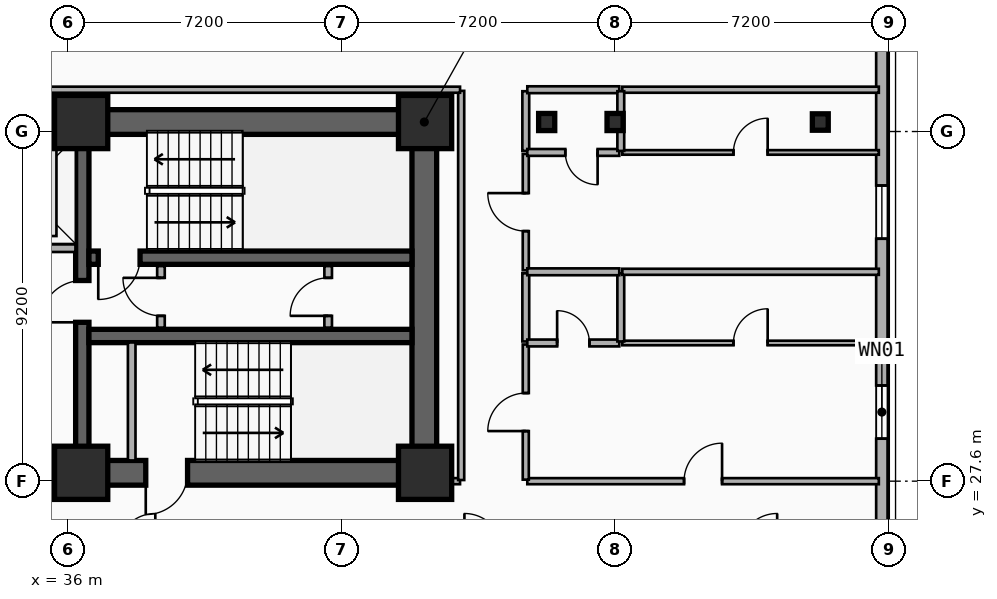
"""IFC4 building model, lengths in metres.
Left out: names, types, materials, properties, quantities, classifications, styles, units other than length and angle.
Written with IfcOpenShell. Run it as: python <this file> out.ifc"""

import sys

from ifc_helpers import new_model, si_unit, direction, frame, frame_2d, origin, origin_2d, place, context, subcontext, project, spatial, rectangle, i_section, extrude, element, fill, save


model = new_model("IFC4")
c1 = context("Model", 3, precision=1e-05, world=origin(), true_north=direction((0.0, 1.0)))
c2 = subcontext(c1, "Body", "Model", "MODEL_VIEW")
j1 = project(units=[si_unit("LENGTHUNIT", "METRE"), si_unit("PLANEANGLEUNIT", "RADIAN")], contexts=[c1])
p1 = place(None, origin())
s1 = spatial("IfcSite", under=j1, at=p1, CompositionType="ELEMENT")
p2 = place(p1, origin())
s2 = spatial("IfcBuilding", under=s1, at=p2, CompositionType="ELEMENT")
p3 = place(p2, frame((0.0, 0.0, 82.8)))
s3 = spatial("IfcBuildingStorey", under=s2, at=p3, CompositionType="ELEMENT", Elevation=82.8)
p4 = place(p3, frame((12.15, 37.05, 0.0), z_axis=(0.0, 0.0, 1.0), x_axis=(1.0, 0.0, 0.0)))
e1 = element("IfcWall", 1, at=p4, inside=s3, PredefinedType="SHEAR", context=c2, shape_type="SweptSolid", body=[
    extrude(rectangle(XDim=33.23, YDim=0.65, at=frame_2d((16.615, 0.0))), origin(), (0.0, 0.0, 1.0), 3.5),
])
p5 = place(p3, frame((45.38, 27.82, 0.0), z_axis=(0.0, 0.0, 1.0), x_axis=(-1.0, 0.0, 0.0)))
e2 = element("IfcWall", 2, at=p5, inside=s3, PredefinedType="SHEAR", context=c2, shape_type="SweptSolid", body=[
    extrude(rectangle(XDim=12.23, YDim=0.65, at=frame_2d((6.115, 0.0))), origin(), (0.0, 0.0, 1.0), 3.5),
])
p6 = place(p5, frame((9.93, 0.0, 0.0)))
e3 = element("IfcOpeningElement", 3, at=p6, cuts=e2, PredefinedType="OPENING", context=c2, shape_type="SweptSolid", body=[
    extrude(rectangle(XDim=1.1, YDim=2.15, at=frame_2d((0.55, 1.075))), frame((0.0, 0.335, 0.0), z_axis=(0.0, -1.0, 0.0), x_axis=(1.0, 0.0, 0.0)), (0.0, 0.0, 1.0), 0.67),
])
p7 = place(p5, frame((6.23, 0.0, 0.0)))
e4 = element("IfcOpeningElement", 4, at=p7, cuts=e2, PredefinedType="OPENING", context=c2, shape_type="SweptSolid", body=[
    extrude(rectangle(XDim=1.1, YDim=2.15, at=frame_2d((0.55, 1.075))), frame((0.0, 0.335, 0.0), z_axis=(0.0, -1.0, 0.0), x_axis=(1.0, 0.0, 0.0)), (0.0, 0.0, 1.0), 0.67),
])
p8 = place(p3, frame((45.38, 28.145, 0.0), z_axis=(0.0, 0.0, 1.0), x_axis=(0.0, 1.0, 0.0)))
e5 = element("IfcWall", 5, at=p8, inside=s3, PredefinedType="SHEAR", context=c2, shape_type="SweptSolid", body=[
    extrude(rectangle(XDim=8.58, YDim=0.65, at=frame_2d((4.29, 0.0))), origin(), (0.0, 0.0, 1.0), 3.5),
])
p9 = place(p3, frame((36.38, 28.145, 0.0), z_axis=(0.0, 0.0, 1.0), x_axis=(0.0, 1.0, 0.0)))
e6 = element("IfcWall", 6, at=p9, inside=s3, PredefinedType="SHEAR", context=c2, shape_type="SweptSolid", body=[
    extrude(rectangle(XDim=8.58, YDim=0.35, at=frame_2d((4.29, 0.0))), origin(), (0.0, 0.0, 1.0), 3.5),
])
p10 = place(p9, frame((3.635, 0.0, 0.0)))
e7 = element("IfcOpeningElement", 7, at=p10, cuts=e6, PredefinedType="OPENING", context=c2, shape_type="SweptSolid", body=[
    extrude(rectangle(XDim=1.1, YDim=2.15, at=frame_2d((0.55, 1.075))), frame((0.0, 0.185, 0.0), z_axis=(0.0, -1.0, 0.0), x_axis=(1.0, 0.0, 0.0)), (0.0, 0.0, 1.0), 0.37),
])
p11 = place(p3, frame((45.055, 33.48, 0.0), z_axis=(0.0, 0.0, 1.0), x_axis=(-1.0, 0.0, 0.0)))
e8 = element("IfcWall", 8, at=p11, inside=s3, PredefinedType="SHEAR", context=c2, shape_type="SweptSolid", body=[
    extrude(rectangle(XDim=8.5, YDim=0.35, at=frame_2d((4.25, 0.0))), origin(), (0.0, 0.0, 1.0), 3.5),
])
p12 = place(p11, frame((7.155, 0.0, 0.0)))
e9 = element("IfcOpeningElement", 9, at=p12, cuts=e8, PredefinedType="OPENING", context=c2, shape_type="SweptSolid", body=[
    extrude(rectangle(XDim=1.1, YDim=2.15, at=frame_2d((0.55, 1.075))), frame((0.0, 0.185, 0.0), z_axis=(0.0, -1.0, 0.0), x_axis=(1.0, 0.0, 0.0)), (0.0, 0.0, 1.0), 0.37),
])
p13 = place(p3, frame((36.555, 31.42, 0.0), z_axis=(0.0, 0.0, 1.0), x_axis=(1.0, 0.0, 0.0)))
e10 = element("IfcWall", 10, at=p13, inside=s3, PredefinedType="SHEAR", context=c2, shape_type="SweptSolid", body=[
    extrude(rectangle(XDim=8.5, YDim=0.35, at=frame_2d((4.25, 0.0))), origin(), (0.0, 0.0, 1.0), 3.5),
])
for number, where, z_axis, x_axis in (
    (11, (36.35, 27.82, 0.0), (0.0, 0.0, 1.0), (1.0, 0.0, 0.0)),
    (12, (36.35, 37.05, 0.0), (0.0, 0.0, 1.0), (1.0, 0.0, 0.0)),
    (13, (45.4, 27.82, 0.0), (0.0, 0.0, 1.0), (1.0, 0.0, 0.0)),
    (14, (45.4, 37.05, 0.0), (0.0, 0.0, 1.0), (1.0, 0.0, 0.0)),
):
    element("IfcColumn", number, at=place(p3, frame(where, z_axis=z_axis, x_axis=x_axis)), inside=s3, PredefinedType="COLUMN", context=c2, shape_type="SweptSolid", body=[
        extrude(rectangle(XDim=1.4, YDim=1.4, at=origin_2d()), origin(), (0.0, 0.0, 1.0), 3.5),
    ])
for number, where, z_axis, x_axis in (
    (15, (48.6, 37.05, 0.0), (0.0, 0.0, 1.0), (1.0, 0.0, 0.0)),
    (16, (50.4, 37.05, 0.0), (0.0, 0.0, 1.0), (1.0, 0.0, 0.0)),
):
    element("IfcColumn", number, at=place(p3, frame(where, z_axis=z_axis, x_axis=x_axis)), inside=s3, PredefinedType="COLUMN", context=c2, shape_type="SweptSolid", body=[
        extrude(i_section(OverallWidth=0.424, OverallDepth=0.45, WebThickness=0.041, FlangeThickness=0.065, FilletRadius=0.015, at=origin_2d()), origin(), (0.0, 0.0, 1.0), 3.5),
    ])
p14 = place(p3, frame((55.8, 37.05, 0.0), z_axis=(0.0, 0.0, 1.0), x_axis=(1.0, 0.0, 0.0)))
e17 = element("IfcColumn", 17, at=p14, inside=s3, PredefinedType="COLUMN", context=c2, shape_type="SweptSolid", body=[
    extrude(i_section(OverallWidth=0.418, OverallDepth=0.432, WebThickness=0.035, FlangeThickness=0.056, FilletRadius=0.015, at=origin_2d()), origin(), (0.0, 0.0, 1.0), 3.5),
])
p15 = place(p3, frame((57.42, 39.0, 0.0), z_axis=(0.0, 0.0, 1.0), x_axis=(0.0, -1.0, 0.0)))
e18 = element("IfcWall", 18, at=p15, inside=s3, PredefinedType="SOLIDWALL", context=c2, shape_type="SweptSolid", body=[
    extrude(rectangle(XDim=18.0, YDim=0.3, at=frame_2d((9.0, 0.0))), origin(), (0.0, 0.0, 1.0), 3.24),
])
p16 = place(p15, frame((8.882, 0.0, 0.48)))
e19 = element("IfcOpeningElement", 19, at=p16, cuts=e18, PredefinedType="OPENING", context=c2, shape_type="SweptSolid", body=[
    extrude(rectangle(XDim=1.4, YDim=1.8, at=frame_2d((0.7, 0.9))), frame((0.0, 0.16, 0.0), z_axis=(0.0, -1.0, 0.0), x_axis=(1.0, 0.0, 0.0)), (0.0, 0.0, 1.0), 0.32),
])
p17 = place(p15, frame((3.621, 0.0, 0.48)))
e20 = element("IfcOpeningElement", 20, at=p17, cuts=e18, PredefinedType="OPENING", context=c2, shape_type="SweptSolid", body=[
    extrude(rectangle(XDim=1.4, YDim=1.8, at=frame_2d((0.7, 0.9))), frame((0.0, 0.16, 0.0), z_axis=(0.0, -1.0, 0.0), x_axis=(1.0, 0.0, 0.0)), (0.0, 0.0, 1.0), 0.32),
])
p18 = place(p15, frame((16.28, 0.0, 0.65)))
e21 = element("IfcOpeningElement", 21, at=p18, cuts=e18, PredefinedType="OPENING", context=c2, shape_type="SweptSolid", body=[
    extrude(rectangle(XDim=1.4, YDim=1.8, at=frame_2d((0.7, 0.9))), frame((0.0, 0.16, 0.0), z_axis=(0.0, -1.0, 0.0), x_axis=(1.0, 0.0, 0.0)), (0.0, 0.0, 1.0), 0.32),
])
p19 = place(p3, frame((33.475, 33.73, 0.0), z_axis=(0.0, 0.0, 1.0), x_axis=(1.0, 0.0, 0.0)))
e22 = element("IfcWall", 22, at=p19, inside=s3, PredefinedType="PARTITIONING", context=c2, shape_type="SweptSolid", body=[
    extrude(rectangle(XDim=2.725, YDim=0.2, at=frame_2d((1.362, 0.0))), origin(), (0.0, 0.0, 1.0), 2.212),
])
p20 = place(p19, frame((0.812, 0.0, 0.0)))
e23 = element("IfcOpeningElement", 23, at=p20, cuts=e22, PredefinedType="OPENING", context=c2, shape_type="SweptSolid", body=[
    extrude(rectangle(XDim=1.1, YDim=2.15, at=frame_2d((0.55, 1.075))), frame((0.0, 0.11, 0.0), z_axis=(0.0, -1.0, 0.0), x_axis=(1.0, 0.0, 0.0)), (0.0, 0.0, 1.0), 0.22),
])
p21 = place(p3, frame((37.68, 28.145, 0.0), z_axis=(0.0, 0.0, 1.0), x_axis=(0.0, 1.0, 0.0)))
e24 = element("IfcWall", 24, at=p21, inside=s3, PredefinedType="PARTITIONING", context=c2, shape_type="SweptSolid", body=[
    extrude(rectangle(XDim=3.105, YDim=0.2, at=frame_2d((1.552, 0.0))), origin(), (0.0, 0.0, 1.0), 2.62),
])
p22 = place(p3, frame((38.45, 31.64, 0.0), z_axis=(0.0, 0.0, 1.0), x_axis=(0.0, 1.0, 0.0)))
e25 = element("IfcWall", 25, at=p22, inside=s3, PredefinedType="PARTITIONING", context=c2, shape_type="SweptSolid", body=[
    extrude(rectangle(XDim=1.62, YDim=0.2, at=frame_2d((0.81, 0.0))), origin(), (0.0, 0.0, 1.0), 3.24),
])
p23 = place(p22, frame((0.31, 0.0, 0.0)))
e26 = element("IfcOpeningElement", 26, at=p23, cuts=e25, PredefinedType="OPENING", context=c2, shape_type="SweptSolid", body=[
    extrude(rectangle(XDim=1.0, YDim=2.15, at=frame_2d((0.5, 1.075))), frame((0.0, 0.11, 0.0), z_axis=(0.0, -1.0, 0.0), x_axis=(1.0, 0.0, 0.0)), (0.0, 0.0, 1.0), 0.22),
])
p24 = place(p3, frame((42.85, 31.64, 0.0), z_axis=(0.0, 0.0, 1.0), x_axis=(0.0, 1.0, 0.0)))
e27 = element("IfcWall", 27, at=p24, inside=s3, PredefinedType="PARTITIONING", context=c2, shape_type="SweptSolid", body=[
    extrude(rectangle(XDim=1.62, YDim=0.2, at=frame_2d((0.81, 0.0))), origin(), (0.0, 0.0, 1.0), 3.24),
])
p25 = place(p24, frame((0.31, 0.0, 0.0)))
e28 = element("IfcOpeningElement", 28, at=p25, cuts=e27, PredefinedType="OPENING", context=c2, shape_type="SweptSolid", body=[
    extrude(rectangle(XDim=1.0, YDim=2.15, at=frame_2d((0.5, 1.075))), frame((0.0, 0.11, 0.0), z_axis=(0.0, -1.0, 0.0), x_axis=(1.0, 0.0, 0.0)), (0.0, 0.0, 1.0), 0.22),
])
p26 = place(p3, frame((48.09, 27.6, 0.0), z_axis=(0.0, 0.0, 1.0), x_axis=(1.0, 0.0, 0.0)))
e29 = element("IfcWall", 29, at=p26, inside=s3, PredefinedType="PARTITIONING", context=c2, shape_type="SweptSolid", body=[
    extrude(rectangle(XDim=9.25, YDim=0.16, at=frame_2d((4.625, 0.0))), origin(), (0.0, 0.0, 1.0), 2.57),
])
p27 = place(p26, frame((4.125, 0.0, 0.0)))
e30 = element("IfcOpeningElement", 30, at=p27, cuts=e29, PredefinedType="OPENING", context=c2, shape_type="SweptSolid", body=[
    extrude(rectangle(XDim=1.0, YDim=2.15, at=frame_2d((0.5, 1.075))), frame((0.0, 0.09, 0.0), z_axis=(0.0, -1.0, 0.0), x_axis=(1.0, 0.0, 0.0)), (0.0, 0.0, 1.0), 0.18),
])
p28 = place(p3, frame((48.05, 27.64, 0.0), z_axis=(0.0, 0.0, 1.0), x_axis=(0.0, 1.0, 0.0)))
e31 = element("IfcWall", 31, at=p28, inside=s3, PredefinedType="PARTITIONING", context=c2, shape_type="SweptSolid", body=[
    extrude(rectangle(XDim=3.556, YDim=0.16, at=frame_2d((1.778, 0.0))), origin(), (0.0, 0.0, 1.0), 3.24),
])
p29 = place(p28, frame((1.278, 0.0, 0.0)))
e32 = element("IfcOpeningElement", 32, at=p29, cuts=e31, PredefinedType="OPENING", context=c2, shape_type="SweptSolid", body=[
    extrude(rectangle(XDim=1.0, YDim=2.15, at=frame_2d((0.5, 1.075))), frame((0.0, 0.09, 0.0), z_axis=(0.0, -1.0, 0.0), x_axis=(1.0, 0.0, 0.0)), (0.0, 0.0, 1.0), 0.18),
])
p30 = place(p3, frame((48.05, 31.276, 0.0), z_axis=(0.0, 0.0, 1.0), x_axis=(0.0, 1.0, 0.0)))
e33 = element("IfcWall", 33, at=p30, inside=s3, PredefinedType="PLUMBINGWALL", context=c2, shape_type="SweptSolid", body=[
    extrude(rectangle(XDim=1.793, YDim=0.18, at=frame_2d((0.896, 0.0))), origin(), (0.0, 0.0, 1.0), 3.24),
])
p31 = place(p3, frame((48.05, 33.149, 0.0), z_axis=(0.0, 0.0, 1.0), x_axis=(0.0, 1.0, 0.0)))
e34 = element("IfcWall", 34, at=p31, inside=s3, PredefinedType="PARTITIONING", context=c2, shape_type="SweptSolid", body=[
    extrude(rectangle(XDim=3.061, YDim=0.16, at=frame_2d((1.531, 0.0))), origin(), (0.0, 0.0, 1.0), 3.24),
])
p32 = place(p31, frame((1.031, 0.0, 0.0)))
e35 = element("IfcOpeningElement", 35, at=p32, cuts=e34, PredefinedType="OPENING", context=c2, shape_type="SweptSolid", body=[
    extrude(rectangle(XDim=1.0, YDim=2.15, at=frame_2d((0.5, 1.075))), frame((0.0, 0.09, 0.0), z_axis=(0.0, -1.0, 0.0), x_axis=(1.0, 0.0, 0.0)), (0.0, 0.0, 1.0), 0.18),
])
p33 = place(p3, frame((48.05, 36.29, 0.0), z_axis=(0.0, 0.0, 1.0), x_axis=(0.0, 1.0, 0.0)))
e36 = element("IfcWall", 36, at=p33, inside=s3, PredefinedType="PLUMBINGWALL", context=c2, shape_type="SweptSolid", body=[
    extrude(rectangle(XDim=1.57, YDim=0.18, at=frame_2d((0.785, 0.0))), origin(), (0.0, 0.0, 1.0), 2.72),
])
p34 = place(p3, frame((48.09, 37.9, 0.0), z_axis=(0.0, 0.0, 1.0), x_axis=(1.0, 0.0, 0.0)))
e37 = element("IfcWall", 37, at=p34, inside=s3, PredefinedType="PLUMBINGWALL", context=c2, shape_type="SweptSolid", body=[
    extrude(rectangle(XDim=2.42, YDim=0.18, at=frame_2d((1.21, 0.0))), origin(), (0.0, 0.0, 1.0), 3.24),
])
p35 = place(p3, frame((50.59, 37.9, 0.0), z_axis=(0.0, 0.0, 1.0), x_axis=(1.0, 0.0, 0.0)))
e38 = element("IfcWall", 38, at=p35, inside=s3, PredefinedType="PARTITIONING", context=c2, shape_type="SweptSolid", body=[
    extrude(rectangle(XDim=6.75, YDim=0.16, at=frame_2d((3.375, 0.0))), origin(), (0.0, 0.0, 1.0), 3.24),
])
p36 = place(p3, frame((48.09, 31.236, 0.0), z_axis=(0.0, 0.0, 1.0), x_axis=(1.0, 0.0, 0.0)))
e39 = element("IfcWall", 39, at=p36, inside=s3, PredefinedType="PLUMBINGWALL", context=c2, shape_type="SweptSolid", body=[
    extrude(rectangle(XDim=2.42, YDim=0.18, at=frame_2d((1.21, 0.0))), origin(), (0.0, 0.0, 1.0), 2.57),
])
p37 = place(p36, frame((0.785, 0.0, 0.0)))
e40 = element("IfcOpeningElement", 40, at=p37, cuts=e39, PredefinedType="OPENING", context=c2, shape_type="SweptSolid", body=[
    extrude(rectangle(XDim=0.85, YDim=2.1, at=frame_2d((0.425, 1.05))), frame((0.0, 0.1, 0.0), z_axis=(0.0, -1.0, 0.0), x_axis=(1.0, 0.0, 0.0)), (0.0, 0.0, 1.0), 0.2),
])
p38 = place(p3, frame((50.59, 31.236, 0.0), z_axis=(0.0, 0.0, 1.0), x_axis=(1.0, 0.0, 0.0)))
e41 = element("IfcWall", 41, at=p38, inside=s3, PredefinedType="PARTITIONING", context=c2, shape_type="SweptSolid", body=[
    extrude(rectangle(XDim=6.75, YDim=0.12, at=frame_2d((3.375, 0.0))), origin(), (0.0, 0.0, 1.0), 2.57),
])
p39 = place(p38, frame((2.925, 0.0, 0.0)))
e42 = element("IfcOpeningElement", 42, at=p39, cuts=e41, PredefinedType="OPENING", context=c2, shape_type="SweptSolid", body=[
    extrude(rectangle(XDim=0.9, YDim=2.1, at=frame_2d((0.45, 1.05))), frame((0.0, 0.07, 0.0), z_axis=(0.0, -1.0, 0.0), x_axis=(1.0, 0.0, 0.0)), (0.0, 0.0, 1.0), 0.14),
])
p40 = place(p3, frame((50.55, 31.276, 0.0), z_axis=(0.0, 0.0, 1.0), x_axis=(0.0, 1.0, 0.0)))
e43 = element("IfcWall", 43, at=p40, inside=s3, PredefinedType="PLUMBINGWALL", context=c2, shape_type="SweptSolid", body=[
    extrude(rectangle(XDim=1.793, YDim=0.18, at=frame_2d((0.896, 0.0))), origin(), (0.0, 0.0, 1.0), 2.57),
])
p41 = place(p3, frame((48.09, 33.109, 0.0), z_axis=(0.0, 0.0, 1.0), x_axis=(1.0, 0.0, 0.0)))
e44 = element("IfcWall", 44, at=p41, inside=s3, PredefinedType="PLUMBINGWALL", context=c2, shape_type="SweptSolid", body=[
    extrude(rectangle(XDim=2.42, YDim=0.18, at=frame_2d((1.21, 0.0))), origin(), (0.0, 0.0, 1.0), 2.57),
])
p42 = place(p3, frame((50.59, 33.109, 0.0), z_axis=(0.0, 0.0, 1.0), x_axis=(1.0, 0.0, 0.0)))
e45 = element("IfcWall", 45, at=p42, inside=s3, PredefinedType="PARTITIONING", context=c2, shape_type="SweptSolid", body=[
    extrude(rectangle(XDim=6.75, YDim=0.16, at=frame_2d((3.375, 0.0))), origin(), (0.0, 0.0, 1.0), 2.57),
])
p43 = place(p3, frame((50.51, 36.25, 0.0), z_axis=(0.0, 0.0, 1.0), x_axis=(-1.0, 0.0, 0.0)))
e46 = element("IfcWall", 46, at=p43, inside=s3, PredefinedType="PLUMBINGWALL", context=c2, shape_type="SweptSolid", body=[
    extrude(rectangle(XDim=2.42, YDim=0.18, at=frame_2d((1.21, 0.0))), origin(), (0.0, 0.0, 1.0), 2.57),
])
p44 = place(p43, frame((0.57, 0.0, 0.0)))
e47 = element("IfcOpeningElement", 47, at=p44, cuts=e46, PredefinedType="OPENING", context=c2, shape_type="SweptSolid", body=[
    extrude(rectangle(XDim=0.85, YDim=2.1, at=frame_2d((0.425, 1.05))), frame((0.0, 0.1, 0.0), z_axis=(0.0, -1.0, 0.0), x_axis=(1.0, 0.0, 0.0)), (0.0, 0.0, 1.0), 0.2),
])
p45 = place(p3, frame((50.59, 36.25, 0.0), z_axis=(0.0, 0.0, 1.0), x_axis=(1.0, 0.0, 0.0)))
e48 = element("IfcWall", 48, at=p45, inside=s3, PredefinedType="PARTITIONING", context=c2, shape_type="SweptSolid", body=[
    extrude(rectangle(XDim=6.75, YDim=0.12, at=frame_2d((3.375, 0.0))), origin(), (0.0, 0.0, 1.0), 2.57),
])
p46 = place(p45, frame((2.925, 0.0, 0.0)))
e49 = element("IfcOpeningElement", 49, at=p46, cuts=e48, PredefinedType="OPENING", context=c2, shape_type="SweptSolid", body=[
    extrude(rectangle(XDim=0.9, YDim=2.1, at=frame_2d((0.45, 1.05))), frame((0.0, 0.07, 0.0), z_axis=(0.0, -1.0, 0.0), x_axis=(1.0, 0.0, 0.0)), (0.0, 0.0, 1.0), 0.14),
])
p47 = place(p3, frame((50.55, 36.29, 0.0), z_axis=(0.0, 0.0, 1.0), x_axis=(0.0, 1.0, 0.0)))
e50 = element("IfcWall", 50, at=p47, inside=s3, PredefinedType="PLUMBINGWALL", context=c2, shape_type="SweptSolid", body=[
    extrude(rectangle(XDim=1.57, YDim=0.18, at=frame_2d((0.785, 0.0))), origin(), (0.0, 0.0, 1.0), 2.57),
])
p48 = place(p3, frame((45.41, 27.6, 0.0), z_axis=(0.0, 0.0, 1.0), x_axis=(1.0, 0.0, 0.0)))
e51 = element("IfcWall", 51, at=p48, inside=s3, PredefinedType="PARTITIONING", context=c2, shape_type="SweptSolid", body=[
    extrude(rectangle(XDim=0.91, YDim=0.16, at=frame_2d((0.455, 0.0))), origin(), (0.0, 0.0, 1.0), 2.28),
])
p49 = place(p3, frame((46.35, 27.63, 0.0), z_axis=(0.0, 0.0, 1.0), x_axis=(0.0, 1.0, 0.0)))
e52 = element("IfcWall", 52, at=p49, inside=s3, PredefinedType="PARTITIONING", context=c2, shape_type="SweptSolid", body=[
    extrude(rectangle(XDim=10.24, YDim=0.16, at=frame_2d((5.12, 0.0))), origin(), (0.0, 0.0, 1.0), 2.72),
])
p50 = place(p3, frame((11.28, 37.9, 0.0), z_axis=(0.0, 0.0, 1.0), x_axis=(1.0, 0.0, 0.0)))
e53 = element("IfcWall", 53, at=p50, inside=s3, PredefinedType="PARTITIONING", context=c2, shape_type="SweptSolid", body=[
    extrude(rectangle(XDim=35.04, YDim=0.16, at=frame_2d((17.52, 0.0))), origin(), (0.0, 0.0, 1.0), 3.24),
])
p51 = place(p16, origin())
e54 = element("IfcWindow", 54, at=p51, inside=s3, PartitioningType="SINGLE_PANEL", PredefinedType="WINDOW", context=c2, shape_type="SweptSolid", body=[
    extrude(rectangle(XDim=1.4, YDim=1.8, at=frame_2d((0.7, 0.9))), frame((0.0, 0.03, 0.0), z_axis=(0.0, -1.0, 0.0), x_axis=(1.0, 0.0, 0.0)), (0.0, 0.0, 1.0), 0.06),
])
fill(e19, e54)
p52 = place(p17, origin())
e55 = element("IfcWindow", 55, at=p52, inside=s3, PartitioningType="SINGLE_PANEL", PredefinedType="WINDOW", context=c2, shape_type="SweptSolid", body=[
    extrude(rectangle(XDim=1.4, YDim=1.8, at=frame_2d((0.7, 0.9))), frame((0.0, 0.03, 0.0), z_axis=(0.0, -1.0, 0.0), x_axis=(1.0, 0.0, 0.0)), (0.0, 0.0, 1.0), 0.06),
])
fill(e20, e55)
p53 = place(p12, origin())
e56 = element("IfcDoor", 56, at=p53, inside=s3, OperationType="SINGLE_SWING_RIGHT", PredefinedType="DOOR", context=c2, shape_type="SweptSolid", body=[
    extrude(rectangle(XDim=1.1, YDim=2.15, at=frame_2d((0.55, 1.075))), frame((0.0, 0.025, 0.0), z_axis=(0.0, -1.0, 0.0), x_axis=(1.0, 0.0, 0.0)), (0.0, 0.0, 1.0), 0.05),
])
fill(e9, e56)
p54 = place(p10, origin())
e57 = element("IfcDoor", 57, at=p54, inside=s3, OperationType="SINGLE_SWING_LEFT", PredefinedType="DOOR", context=c2, shape_type="SweptSolid", body=[
    extrude(rectangle(XDim=1.1, YDim=2.15, at=frame_2d((0.55, 1.075))), frame((0.0, 0.025, 0.0), z_axis=(0.0, -1.0, 0.0), x_axis=(1.0, 0.0, 0.0)), (0.0, 0.0, 1.0), 0.05),
])
fill(e7, e57)
p55 = place(p7, origin())
e58 = element("IfcDoor", 58, at=p55, inside=s3, OperationType="SINGLE_SWING_RIGHT", PredefinedType="DOOR", context=c2, shape_type="SweptSolid", body=[
    extrude(rectangle(XDim=1.1, YDim=2.15, at=frame_2d((0.55, 1.075))), frame((0.0, 0.025, 0.0), z_axis=(0.0, -1.0, 0.0), x_axis=(1.0, 0.0, 0.0)), (0.0, 0.0, 1.0), 0.05),
])
fill(e4, e58)
p56 = place(p23, origin())
e59 = element("IfcDoor", 59, at=p56, inside=s3, OperationType="SINGLE_SWING_RIGHT", PredefinedType="DOOR", context=c2, shape_type="SweptSolid", body=[
    extrude(rectangle(XDim=1.0, YDim=2.15, at=frame_2d((0.5, 1.075))), frame((0.0, 0.025, 0.0), z_axis=(0.0, -1.0, 0.0), x_axis=(1.0, 0.0, 0.0)), (0.0, 0.0, 1.0), 0.05),
])
fill(e26, e59)
p57 = place(p25, origin())
e60 = element("IfcDoor", 60, at=p57, inside=s3, OperationType="SINGLE_SWING_LEFT", PredefinedType="DOOR", context=c2, shape_type="SweptSolid", body=[
    extrude(rectangle(XDim=1.0, YDim=2.15, at=frame_2d((0.5, 1.075))), frame((0.0, 0.025, 0.0), z_axis=(0.0, -1.0, 0.0), x_axis=(1.0, 0.0, 0.0)), (0.0, 0.0, 1.0), 0.05),
])
fill(e28, e60)
p58 = place(p27, origin())
e61 = element("IfcDoor", 61, at=p58, inside=s3, OperationType="SINGLE_SWING_RIGHT", PredefinedType="DOOR", context=c2, shape_type="SweptSolid", body=[
    extrude(rectangle(XDim=1.0, YDim=2.15, at=frame_2d((0.5, 1.075))), frame((0.0, 0.025, 0.0), z_axis=(0.0, -1.0, 0.0), x_axis=(1.0, 0.0, 0.0)), (0.0, 0.0, 1.0), 0.05),
])
fill(e30, e61)
p59 = place(p29, origin())
e62 = element("IfcDoor", 62, at=p59, inside=s3, OperationType="SINGLE_SWING_LEFT", PredefinedType="DOOR", context=c2, shape_type="SweptSolid", body=[
    extrude(rectangle(XDim=1.0, YDim=2.15, at=frame_2d((0.5, 1.075))), frame((0.0, 0.025, 0.0), z_axis=(0.0, -1.0, 0.0), x_axis=(1.0, 0.0, 0.0)), (0.0, 0.0, 1.0), 0.05),
])
fill(e32, e62)
p60 = place(p32, origin())
e63 = element("IfcDoor", 63, at=p60, inside=s3, OperationType="SINGLE_SWING_RIGHT", PredefinedType="DOOR", context=c2, shape_type="SweptSolid", body=[
    extrude(rectangle(XDim=1.0, YDim=2.15, at=frame_2d((0.5, 1.075))), frame((0.0, 0.025, 0.0), z_axis=(0.0, -1.0, 0.0), x_axis=(1.0, 0.0, 0.0)), (0.0, 0.0, 1.0), 0.05),
])
fill(e35, e63)
p61 = place(p37, origin())
e64 = element("IfcDoor", 64, at=p61, inside=s3, OperationType="SINGLE_SWING_LEFT", PredefinedType="DOOR", context=c2, shape_type="SweptSolid", body=[
    extrude(rectangle(XDim=0.85, YDim=2.1, at=frame_2d((0.425, 1.05))), frame((0.0, 0.025, 0.0), z_axis=(0.0, -1.0, 0.0), x_axis=(1.0, 0.0, 0.0)), (0.0, 0.0, 1.0), 0.05),
])
fill(e40, e64)
p62 = place(p39, origin())
e65 = element("IfcDoor", 65, at=p62, inside=s3, OperationType="SINGLE_SWING_RIGHT", PredefinedType="DOOR", context=c2, shape_type="SweptSolid", body=[
    extrude(rectangle(XDim=0.9, YDim=2.1, at=frame_2d((0.45, 1.05))), frame((0.0, 0.025, 0.0), z_axis=(0.0, -1.0, 0.0), x_axis=(1.0, 0.0, 0.0)), (0.0, 0.0, 1.0), 0.05),
])
fill(e42, e65)
p63 = place(p44, origin())
e66 = element("IfcDoor", 66, at=p63, inside=s3, OperationType="SINGLE_SWING_LEFT", PredefinedType="DOOR", context=c2, shape_type="SweptSolid", body=[
    extrude(rectangle(XDim=0.85, YDim=2.1, at=frame_2d((0.425, 1.05))), frame((0.0, 0.025, 0.0), z_axis=(0.0, -1.0, 0.0), x_axis=(1.0, 0.0, 0.0)), (0.0, 0.0, 1.0), 0.05),
])
fill(e47, e66)
p64 = place(p46, origin())
e67 = element("IfcDoor", 67, at=p64, inside=s3, OperationType="SINGLE_SWING_RIGHT", PredefinedType="DOOR", context=c2, shape_type="SweptSolid", body=[
    extrude(rectangle(XDim=0.9, YDim=2.1, at=frame_2d((0.45, 1.05))), frame((0.0, 0.025, 0.0), z_axis=(0.0, -1.0, 0.0), x_axis=(1.0, 0.0, 0.0)), (0.0, 0.0, 1.0), 0.05),
])
fill(e49, e67)
save(model, sys.argv[1])
